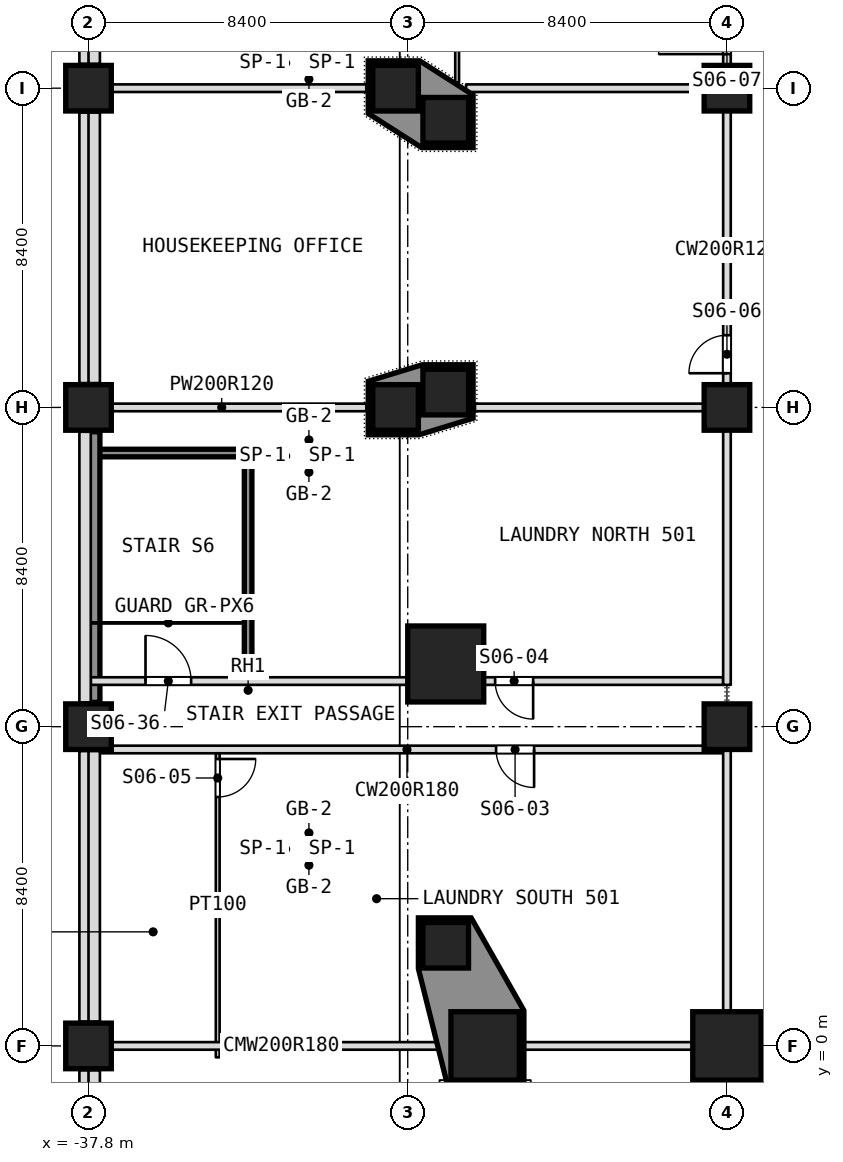
"""IFC4 building model, lengths in metres.
Left out: names, types, materials, properties, quantities, classifications, styles, units other than length and angle.
Written with IfcOpenShell. Run it as: python <this file> out.ifc"""

import sys

from ifc_helpers import new_model, si_unit, direction, frame, frame_2d, origin, origin_2d, place, context, subcontext, project, spatial, polyline, rectangle, outline, extrude, element, fill, save


model = new_model("IFC4")
c1 = context("Model", 3, precision=1e-05, world=origin(), true_north=direction((0.0, 1.0)))
c2 = subcontext(c1, "Body", "Model", "MODEL_VIEW")
j1 = project(units=[si_unit("LENGTHUNIT", "METRE"), si_unit("PLANEANGLEUNIT", "RADIAN")], contexts=[c1])
p1 = place(None, origin())
s1 = spatial("IfcSite", under=j1, at=p1, CompositionType="ELEMENT")
p2 = place(p1, origin())
s2 = spatial("IfcBuilding", under=s1, at=p2, CompositionType="ELEMENT")
p3 = place(p2, frame((0.0, 0.0, 31.0)))
s3 = spatial("IfcBuildingStorey", under=s2, at=p3, CompositionType="ELEMENT", Elevation=31.0)
p4 = place(p3, frame((-37.8, 0.0, 0.0), z_axis=(0.0, 0.0, 1.0), x_axis=(1.0, 0.0, 0.0)))
e1 = element("IfcColumn", 1, at=p4, inside=s3, PredefinedType="COLUMN", context=c2, shape_type="SweptSolid", body=[
    extrude(rectangle(XDim=1.2, YDim=1.2, at=origin_2d()), origin(), (0.0, 0.0, 1.0), 5.5),
])
p5 = place(p3, frame((-21.0, 0.0, 0.0), z_axis=(0.0, 0.0, 1.0), x_axis=(1.0, 0.0, 0.0)))
e2 = element("IfcColumn", 2, at=p5, inside=s3, PredefinedType="COLUMN", context=c2, shape_type="SweptSolid", body=[
    extrude(rectangle(XDim=1.8, YDim=1.8, at=origin_2d()), origin(), (0.0, 0.0, 1.0), 5.5),
])
for number, where, z_axis, x_axis in (
    (3, (-37.8, 8.4, 0.0), (0.0, 0.0, 1.0), (1.0, 0.0, 0.0)),
    (4, (-21.0, 8.4, 0.0), (0.0, 0.0, 1.0), (1.0, 0.0, 0.0)),
    (5, (-37.8, 16.8, 0.0), (0.0, 0.0, 1.0), (1.0, 0.0, 0.0)),
    (6, (-29.72, 16.8, 0.0), (0.0, 0.0, 1.0), (1.0, 0.0, 0.0)),
    (7, (-21.0, 16.8, 0.0), (0.0, 0.0, 1.0), (1.0, 0.0, 0.0)),
    (8, (-37.8, 25.2, 0.0), (0.0, 0.0, 1.0), (1.0, 0.0, 0.0)),
    (9, (-29.72, 25.2, 0.0), (0.0, 0.0, 1.0), (1.0, 0.0, 0.0)),
    (10, (-21.0, 25.2, 0.0), (0.0, 0.0, 1.0), (1.0, 0.0, 0.0)),
):
    element("IfcColumn", number, at=place(p3, frame(where, z_axis=z_axis, x_axis=x_axis)), inside=s3, PredefinedType="COLUMN", context=c2, shape_type="SweptSolid", body=[
        extrude(rectangle(XDim=1.2, YDim=1.2, at=origin_2d()), origin(), (0.0, 0.0, 1.0), 5.5),
    ])
p6 = place(p3, frame((-27.363, 0.0, 0.0), z_axis=(0.0, 0.0, 1.0), x_axis=(1.0, 0.0, 0.0)))
e11 = element("IfcColumn", 11, at=p6, inside=s3, PredefinedType="COLUMN", context=c2, shape_type="SweptSolid", body=[
    extrude(rectangle(XDim=1.8, YDim=1.8, at=origin_2d()), origin(), (0.0, 0.0, 1.0), 5.5),
])
p7 = place(p3, frame((-28.4, 10.05, 0.0), z_axis=(0.0, 0.0, 1.0), x_axis=(1.0, 0.0, 0.0)))
e12 = element("IfcColumn", 12, at=p7, inside=s3, PredefinedType="COLUMN", context=c2, shape_type="SweptSolid", body=[
    extrude(rectangle(XDim=2.0, YDim=2.0, at=origin_2d()), origin(), (0.0, 0.0, 1.0), 5.5),
])
for number, where, z_axis, x_axis in (
    (13, (-28.4, 2.649, 0.0), (0.0, 0.0, 1.0), (1.0, 0.0, 0.0)),
    (14, (-28.4, 17.203, 0.0), (0.0, 0.0, 1.0), (1.0, 0.0, 0.0)),
    (15, (-28.4, 24.356, 0.0), (0.0, 0.0, 1.0), (1.0, 0.0, 0.0)),
):
    element("IfcColumn", number, at=place(p3, frame(where, z_axis=z_axis, x_axis=x_axis)), inside=s3, PredefinedType="COLUMN", context=c2, shape_type="SweptSolid", body=[
        extrude(rectangle(XDim=1.2, YDim=1.2, at=origin_2d()), origin(), (0.0, 0.0, 1.0), 5.5),
    ])
p8 = place(p3, frame((-37.74, 7.8, 0.0), z_axis=(0.0, 0.0, 1.0), x_axis=(1.0, 0.0, 0.0)))
e16 = element("IfcWall", 16, at=p8, inside=s3, PredefinedType="PARTITIONING", context=c2, shape_type="SweptSolid", body=[
    extrude(rectangle(XDim=16.64, YDim=0.2, at=frame_2d((8.32, 0.0))), origin(), (0.0, 0.0, 1.0), 5.35),
])
p9 = place(p8, frame((10.665, 0.0, 0.0)))
e17 = element("IfcOpeningElement", 17, at=p9, cuts=e16, PredefinedType="OPENING", context=c2, shape_type="SweptSolid", body=[
    extrude(rectangle(XDim=1.0, YDim=2.1, at=frame_2d((0.5, 1.05))), frame((0.0, 0.1, 0.0), z_axis=(0.0, -1.0, 0.0), x_axis=(1.0, 0.0, 0.0)), (0.0, 0.0, 1.0), 0.2),
])
p10 = place(p3, frame((-37.74, 9.6, 0.0), z_axis=(0.0, 0.0, 1.0), x_axis=(1.0, 0.0, 0.0)))
e18 = element("IfcWall", 18, at=p10, inside=s3, PredefinedType="PARTITIONING", context=c2, shape_type="SweptSolid", body=[
    extrude(rectangle(XDim=16.64, YDim=0.2, at=frame_2d((8.32, 0.0))), origin(), (0.0, 0.0, 1.0), 4.634),
])
p11 = place(p10, frame((10.64, 0.0, 0.0)))
e19 = element("IfcOpeningElement", 19, at=p11, cuts=e18, PredefinedType="OPENING", context=c2, shape_type="SweptSolid", body=[
    extrude(rectangle(XDim=1.0, YDim=2.1, at=frame_2d((0.5, 1.05))), frame((0.0, 0.1, 0.0), z_axis=(0.0, -1.0, 0.0), x_axis=(1.0, 0.0, 0.0)), (0.0, 0.0, 1.0), 0.2),
])
p12 = place(p10, frame((1.44, 0.0, 0.0)))
e20 = element("IfcOpeningElement", 20, at=p12, cuts=e18, PredefinedType="OPENING", context=c2, shape_type="SweptSolid", body=[
    extrude(rectangle(XDim=1.2, YDim=2.1, at=frame_2d((0.6, 1.05))), frame((0.0, 0.1, 0.0), z_axis=(0.0, -1.0, 0.0), x_axis=(1.0, 0.0, 0.0)), (0.0, 0.0, 1.0), 0.2),
])
p13 = place(p3, frame((-37.74, 15.6, 0.0), z_axis=(0.0, 0.0, 1.0), x_axis=(1.0, 0.0, 0.0)))
e21 = element("IfcWall", 21, at=p13, inside=s3, PredefinedType="PARTITIONING", context=c2, shape_type="SweptSolid", body=[
    extrude(rectangle(XDim=4.24, YDim=0.2, at=frame_2d((2.12, 0.0))), origin(), (0.0, 0.0, 1.0), 5.35),
])
p14 = place(p3, frame((-38.1, 16.8, 0.0), z_axis=(0.0, 0.0, 1.0), x_axis=(1.0, 0.0, 0.0)))
e22 = element("IfcWall", 22, at=p14, inside=s3, PredefinedType="PARTITIONING", context=c2, shape_type="SweptSolid", body=[
    extrude(rectangle(XDim=7.61, YDim=0.2, at=frame_2d((3.805, 0.0))), origin(), (0.0, 0.0, 1.0), 5.35),
])
p15 = place(p3, frame((-27.63, 16.8, 0.0), z_axis=(0.0, 0.0, 1.0), x_axis=(1.0, 0.0, 0.0)))
e23 = element("IfcWall", 23, at=p15, inside=s3, PredefinedType="PARTITIONING", context=c2, shape_type="SweptSolid", body=[
    extrude(rectangle(XDim=6.53, YDim=0.2, at=frame_2d((3.265, 0.0))), origin(), (0.0, 0.0, 1.0), 4.85),
])
p16 = place(p3, frame((-21.0, -0.3, 0.0), z_axis=(0.0, 0.0, 1.0), x_axis=(0.0, 1.0, 0.0)))
e24 = element("IfcWall", 24, at=p16, inside=s3, PredefinedType="PARTITIONING", context=c2, shape_type="SweptSolid", body=[
    extrude(rectangle(XDim=8.2, YDim=0.2, at=frame_2d((4.1, 0.0))), origin(), (0.0, 0.0, 1.0), 4.95),
])
p17 = place(p3, frame((-21.0, 9.5, 0.0), z_axis=(0.0, 0.0, 1.0), x_axis=(0.0, 1.0, 0.0)))
e25 = element("IfcWall", 25, at=p17, inside=s3, PredefinedType="PARTITIONING", context=c2, shape_type="SweptSolid", body=[
    extrude(rectangle(XDim=22.894, YDim=0.2, at=frame_2d((11.447, 0.0))), origin(), (0.0, 0.0, 1.0), 4.95),
])
p18 = place(p17, frame((8.2, 0.0, 0.0)))
e26 = element("IfcOpeningElement", 26, at=p18, cuts=e25, PredefinedType="OPENING", context=c2, shape_type="SweptSolid", body=[
    extrude(rectangle(XDim=1.0, YDim=2.1, at=frame_2d((0.5, 1.05))), frame((0.0, 0.1, 0.0), z_axis=(0.0, -1.0, 0.0), x_axis=(1.0, 0.0, 0.0)), (0.0, 0.0, 1.0), 0.2),
])
p19 = place(p17, frame((16.597, 0.0, 0.0)))
e27 = element("IfcOpeningElement", 27, at=p19, cuts=e25, PredefinedType="OPENING", context=c2, shape_type="SweptSolid", body=[
    extrude(rectangle(XDim=1.8, YDim=2.1, at=frame_2d((0.9, 1.05))), frame((0.0, 0.1, 0.0), z_axis=(0.0, -1.0, 0.0), x_axis=(1.0, 0.0, 0.0)), (0.0, 0.0, 1.0), 0.2),
])
p20 = place(p3, frame((-38.1, 25.2, 0.0), z_axis=(0.0, 0.0, 1.0), x_axis=(1.0, 0.0, 0.0)))
e28 = element("IfcWall", 28, at=p20, inside=s3, PredefinedType="PARTITIONING", context=c2, shape_type="SweptSolid", body=[
    extrude(rectangle(XDim=7.61, YDim=0.2, at=frame_2d((3.805, 0.0))), origin(), (0.0, 0.0, 1.0), 5.35),
])
p21 = place(p3, frame((-27.865, 25.2, 0.0), z_axis=(0.0, 0.0, 1.0), x_axis=(1.0, 0.0, 0.0)))
e29 = element("IfcWall", 29, at=p21, inside=s3, PredefinedType="PARTITIONING", context=c2, shape_type="SweptSolid", body=[
    extrude(rectangle(XDim=6.765, YDim=0.2, at=frame_2d((3.382, 0.0))), origin(), (0.0, 0.0, 1.0), 4.85),
])
p22 = place(p3, frame((-28.1, 25.35, 0.0), z_axis=(0.0, 0.0, 1.0), x_axis=(0.0, 1.0, 0.0)))
e30 = element("IfcWall", 30, at=p22, inside=s3, PredefinedType="PARTITIONING", context=c2, shape_type="SweptSolid", body=[
    extrude(rectangle(XDim=16.59, YDim=0.1, at=frame_2d((8.295, 0.0))), origin(), (0.0, 0.0, 1.0), 4.95),
])
p23 = place(p22, frame((13.025, 0.0, 0.0)))
e31 = element("IfcOpeningElement", 31, at=p23, cuts=e30, PredefinedType="OPENING", context=c2, shape_type="SweptSolid", body=[
    extrude(rectangle(XDim=1.2, YDim=2.1, at=frame_2d((0.6, 1.05))), frame((0.0, 0.05, 0.0), z_axis=(0.0, -1.0, 0.0), x_axis=(1.0, 0.0, 0.0)), (0.0, 0.0, 1.0), 0.1),
])
p24 = place(p3, frame((-33.6, 9.7, 0.0), z_axis=(0.0, 0.0, 1.0), x_axis=(0.0, 1.0, 0.0)))
e32 = element("IfcWall", 32, at=p24, inside=s3, PredefinedType="PARTITIONING", context=c2, shape_type="SweptSolid", body=[
    extrude(rectangle(XDim=5.8, YDim=0.2, at=frame_2d((2.9, 0.0))), origin(), (0.0, 0.0, 1.0), 5.35),
])
p25 = place(p3, frame((-34.4, -0.3, 0.0), z_axis=(0.0, 0.0, 1.0), x_axis=(0.0, 1.0, 0.0)))
e33 = element("IfcWall", 33, at=p25, inside=s3, PredefinedType="PARTITIONING", context=c2, shape_type="SweptSolid", body=[
    extrude(rectangle(XDim=8.0, YDim=0.1, at=frame_2d((4.0, 0.0))), origin(), (0.0, 0.0, 1.0), 5.35),
])
p26 = place(p25, frame((6.85, 0.0, 0.0)))
e34 = element("IfcOpeningElement", 34, at=p26, cuts=e33, PredefinedType="OPENING", context=c2, shape_type="SweptSolid", body=[
    extrude(rectangle(XDim=1.0, YDim=2.1, at=frame_2d((0.5, 1.05))), frame((0.0, 0.05, 0.0), z_axis=(0.0, -1.0, 0.0), x_axis=(1.0, 0.0, 0.0)), (0.0, 0.0, 1.0), 0.1),
])
p27 = place(p3, frame((-37.89, 32.96, 0.0), z_axis=(0.0, 0.0, 1.0), x_axis=(0.0, -1.0, 0.0)))
e35 = element("IfcWall", 35, at=p27, inside=s3, PredefinedType="NOTDEFINED", context=c2, shape_type="SweptSolid", body=[
    extrude(rectangle(XDim=7.12, YDim=0.3, at=frame_2d((3.56, 0.0))), origin(), (0.0, 0.0, 1.0), 4.18),
])
p28 = place(p3, frame((-37.89, 24.56, 0.0), z_axis=(0.0, 0.0, 1.0), x_axis=(0.0, -1.0, 0.0)))
e36 = element("IfcWall", 36, at=p28, inside=s3, PredefinedType="NOTDEFINED", context=c2, shape_type="SweptSolid", body=[
    extrude(rectangle(XDim=7.12, YDim=0.3, at=frame_2d((3.56, 0.0))), origin(), (0.0, 0.0, 1.0), 4.18),
])
p29 = place(p3, frame((-37.89, 16.16, 0.0), z_axis=(0.0, 0.0, 1.0), x_axis=(0.0, -1.0, 0.0)))
e37 = element("IfcWall", 37, at=p29, inside=s3, PredefinedType="NOTDEFINED", context=c2, shape_type="SweptSolid", body=[
    extrude(rectangle(XDim=7.12, YDim=0.3, at=frame_2d((3.56, 0.0))), origin(), (0.0, 0.0, 1.0), 5.5),
])
for number, where, z_axis, x_axis in (
    (38, (-37.89, 7.76, 0.0), (0.0, 0.0, 1.0), (0.0, -1.0, 0.0)),
    (39, (-37.89, -0.64, 0.0), (0.0, 0.0, 1.0), (0.0, -1.0, 0.0)),
):
    element("IfcWall", number, at=place(p3, frame(where, z_axis=z_axis, x_axis=x_axis)), inside=s3, PredefinedType="NOTDEFINED", context=c2, shape_type="SweptSolid", body=[
        extrude(rectangle(XDim=7.12, YDim=0.3, at=frame_2d((3.56, 0.0))), origin(), (0.0, 0.0, 1.0), 4.18),
    ])
for number, where, z_axis, x_axis in (
    (40, (-37.65, -7.76, 5.5), (0.0, 0.0, 1.0), (0.0, 1.0, 0.0)),
    (41, (-37.65, 0.64, 5.5), (0.0, 0.0, 1.0), (0.0, 1.0, 0.0)),
):
    element("IfcWall", number, at=place(p3, frame(where, z_axis=z_axis, x_axis=x_axis)), inside=s3, PredefinedType="PARAPET", context=c2, shape_type="SweptSolid", body=[
        extrude(rectangle(XDim=7.12, YDim=0.3, at=frame_2d((3.56, 0.0))), origin(), (0.0, 0.0, 1.0), 1.1),
    ])
p30 = place(p3, frame((-37.65, 9.04, 5.5), z_axis=(0.0, 0.0, 1.0), x_axis=(0.0, 1.0, 0.0)))
e42 = element("IfcWall", 42, at=p30, inside=s3, PredefinedType="PARAPET", context=c2, shape_type="SweptSolid", body=[
    extrude(rectangle(XDim=7.12, YDim=0.3, at=frame_2d((3.56, 0.0))), origin(), (0.0, 0.0, 1.0), 1.1),
])
p31 = place(p3, frame((-37.65, 17.44, 5.5), z_axis=(0.0, 0.0, 1.0), x_axis=(0.0, 1.0, 0.0)))
e43 = element("IfcWall", 43, at=p31, inside=s3, PredefinedType="PARAPET", context=c2, shape_type="SweptSolid", body=[
    extrude(rectangle(XDim=7.12, YDim=0.3, at=frame_2d((3.56, 0.0))), origin(), (0.0, 0.0, 1.0), 1.1),
])
p32 = place(p3, frame((-37.65, 25.84, 5.5), z_axis=(0.0, 0.0, 1.0), x_axis=(0.0, 1.0, 0.0)))
e44 = element("IfcWall", 44, at=p32, inside=s3, PredefinedType="PARAPET", context=c2, shape_type="SweptSolid", body=[
    extrude(rectangle(XDim=7.12, YDim=0.3, at=frame_2d((3.56, 0.0))), origin(), (0.0, 0.0, 1.0), 1.1),
])
p33 = place(p3, origin())
e45 = element("IfcWall", 45, at=p33, inside=s3, PredefinedType="SOLIDWALL", context=c2, shape_type="SweptSolid", body=[
    extrude(outline(polyline([(-29.12, 2.034), (-29.12, 3.369), (-27.73, 3.369), (-26.343, 0.932), (-26.343, -1.02), (-28.357, -1.02), (-29.12, 2.034)]), holes=[polyline([(-28.263, -0.9), (-26.463, -0.9), (-26.463, 0.9), (-28.263, 0.9), (-28.263, -0.9)]), polyline([(-29.0, 2.049), (-27.8, 2.049), (-27.8, 3.249), (-29.0, 3.249), (-29.0, 2.049)])]), origin(), (0.0, 0.0, 1.0), 5.5),
])
p34 = place(p3, origin())
e46 = element("IfcWall", 46, at=p34, inside=s3, PredefinedType="SOLIDWALL", context=c2, shape_type="SweptSolid", body=[
    extrude(outline(polyline([(-30.44, 17.489), (-29.018, 17.923), (-27.68, 17.923), (-27.68, 16.514), (-29.102, 16.08), (-30.44, 16.08), (-30.44, 17.489)]), holes=[polyline([(-29.0, 16.603), (-27.8, 16.603), (-27.8, 17.803), (-29.0, 17.803), (-29.0, 16.603)]), polyline([(-30.32, 16.2), (-29.12, 16.2), (-29.12, 17.4), (-30.32, 17.4), (-30.32, 16.2)])]), origin(), (0.0, 0.0, 1.0), 5.5),
])
p35 = place(p3, origin())
e47 = element("IfcWall", 47, at=p35, inside=s3, PredefinedType="SOLIDWALL", context=c2, shape_type="SweptSolid", body=[
    extrude(outline(polyline([(-30.44, 24.534), (-30.44, 25.92), (-29.085, 25.92), (-27.68, 25.022), (-27.68, 23.636), (-29.035, 23.636), (-30.44, 24.534)]), holes=[polyline([(-29.0, 23.756), (-27.8, 23.756), (-27.8, 24.956), (-29.0, 24.956), (-29.0, 23.756)]), polyline([(-30.32, 24.6), (-29.12, 24.6), (-29.12, 25.8), (-30.32, 25.8), (-30.32, 24.6)])]), origin(), (0.0, 0.0, 1.0), 5.5),
])
p36 = place(p3, frame((-37.199, 0.0, 0.0), z_axis=(0.0, 0.0, 1.0), x_axis=(1.0, 0.0, 0.0)))
e48 = element("IfcWall", 48, at=p36, inside=s3, PredefinedType="PARTITIONING", context=c2, shape_type="SweptSolid", body=[
    extrude(rectangle(XDim=8.935, YDim=0.2, at=frame_2d((4.468, 0.0))), origin(), (0.0, 0.0, 1.0), 3.58),
])
p37 = place(p3, frame((-26.462, 0.0, 0.0), z_axis=(0.0, 0.0, 1.0), x_axis=(1.0, 0.0, 0.0)))
e49 = element("IfcWall", 49, at=p37, inside=s3, PredefinedType="PARTITIONING", context=c2, shape_type="SweptSolid", body=[
    extrude(rectangle(XDim=4.561, YDim=0.2, at=frame_2d((2.281, 0.0))), origin(), (0.0, 0.0, 1.0), 4.85),
])
p38 = place(p3, frame((-20.099, 0.0, 0.0), z_axis=(0.0, 0.0, 1.0), x_axis=(1.0, 0.0, 0.0)))
e50 = element("IfcWall", 50, at=p38, inside=s3, PredefinedType="PARTITIONING", context=c2, shape_type="SweptSolid", body=[
    extrude(rectangle(XDim=3.198, YDim=0.2, at=frame_2d((1.599, 0.0))), origin(), (0.0, 0.0, 1.0), 4.85),
])
p39 = place(p38, frame((0.399, 0.0, 0.0)))
e51 = element("IfcOpeningElement", 51, at=p39, cuts=e50, PredefinedType="OPENING", context=c2, shape_type="SweptSolid", body=[
    extrude(rectangle(XDim=2.4, YDim=2.1, at=frame_2d((1.2, 1.05))), frame((0.0, 0.1, 0.0), z_axis=(0.0, -1.0, 0.0), x_axis=(1.0, 0.0, 0.0)), (0.0, 0.0, 1.0), 0.2),
])
p40 = place(p9, origin())
e52 = element("IfcDoor", 52, at=p40, inside=s3, OperationType="SINGLE_SWING_LEFT", PredefinedType="DOOR", context=c2, shape_type="SweptSolid", body=[
    extrude(rectangle(XDim=1.0, YDim=2.1, at=frame_2d((0.5, 1.05))), frame((0.0, 0.025, 0.0), z_axis=(0.0, -1.0, 0.0), x_axis=(1.0, 0.0, 0.0)), (0.0, 0.0, 1.0), 0.05),
])
fill(e17, e52)
p41 = place(p11, origin())
e53 = element("IfcDoor", 53, at=p41, inside=s3, OperationType="SINGLE_SWING_RIGHT", PredefinedType="DOOR", context=c2, shape_type="SweptSolid", body=[
    extrude(rectangle(XDim=1.0, YDim=2.1, at=frame_2d((0.5, 1.05))), frame((0.0, 0.025, 0.0), z_axis=(0.0, -1.0, 0.0), x_axis=(1.0, 0.0, 0.0)), (0.0, 0.0, 1.0), 0.05),
])
fill(e19, e53)
p42 = place(p26, origin())
e54 = element("IfcDoor", 54, at=p42, inside=s3, OperationType="SINGLE_SWING_RIGHT", PredefinedType="DOOR", context=c2, shape_type="SweptSolid", body=[
    extrude(rectangle(XDim=1.0, YDim=2.1, at=frame_2d((0.5, 1.05))), frame((0.0, 0.025, 0.0), z_axis=(0.0, -1.0, 0.0), x_axis=(1.0, 0.0, 0.0)), (0.0, 0.0, 1.0), 0.05),
])
fill(e34, e54)
p43 = place(p18, origin())
e55 = element("IfcDoor", 55, at=p43, inside=s3, OperationType="SINGLE_SWING_RIGHT", PredefinedType="DOOR", context=c2, shape_type="SweptSolid", body=[
    extrude(rectangle(XDim=1.0, YDim=2.1, at=frame_2d((0.5, 1.05))), frame((0.0, 0.025, 0.0), z_axis=(0.0, -1.0, 0.0), x_axis=(1.0, 0.0, 0.0)), (0.0, 0.0, 1.0), 0.05),
])
fill(e26, e55)
p44 = place(p19, origin())
e56 = element("IfcDoor", 56, at=p44, inside=s3, OperationType="DOUBLE_DOOR_SINGLE_SWING", PredefinedType="DOOR", context=c2, shape_type="SweptSolid", body=[
    extrude(rectangle(XDim=1.8, YDim=2.1, at=frame_2d((0.9, 1.05))), frame((0.0, 0.025, 0.0), z_axis=(0.0, -1.0, 0.0), x_axis=(1.0, 0.0, 0.0)), (0.0, 0.0, 1.0), 0.05),
])
fill(e27, e56)
p45 = place(p12, origin())
e57 = element("IfcDoor", 57, at=p45, inside=s3, OperationType="SINGLE_SWING_RIGHT", PredefinedType="DOOR", context=c2, shape_type="SweptSolid", body=[
    extrude(rectangle(XDim=1.2, YDim=2.1, at=frame_2d((0.6, 1.05))), frame((0.0, 0.025, 0.0), z_axis=(0.0, -1.0, 0.0), x_axis=(1.0, 0.0, 0.0)), (0.0, 0.0, 1.0), 0.05),
])
fill(e20, e57)
p46 = place(p3, frame((0.0, 0.0, 5.08)))
p47 = place(p46, frame((-33.6, 9.358, 0.0)))
p48 = place(p47, frame((0.0, 0.0, 0.37)))
e58 = element("IfcWindow", 58, at=p48, inside=s3, PartitioningType="SINGLE_PANEL", PredefinedType="SKYLIGHT", context=c2, shape_type="SweptSolid", body=[
    extrude(rectangle(XDim=0.9, YDim=0.9, at=origin_2d()), origin(), (0.0, 0.0, 1.0), 0.05),
])
save(model, sys.argv[1])
